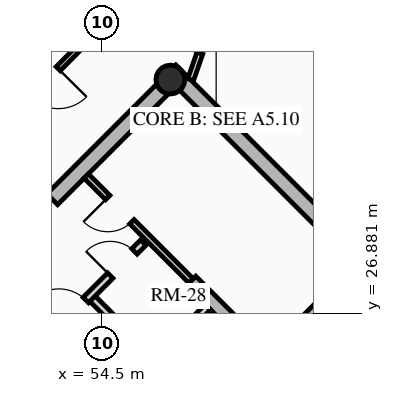
"""IFC4 building model, lengths in metres.
Left out: names, types, materials, properties, quantities, classifications, styles, units other than length and angle.
Written with IfcOpenShell. Run it as: python <this file> out.ifc"""

import sys

from ifc_helpers import new_model, si_unit, direction, frame, frame_2d, origin, origin_2d, place, context, subcontext, project, spatial, rectangle, hollow_circle, extrude, source, transform, mapped, element, fill, save


model = new_model("IFC4")
c1 = context("Model", 3, precision=1e-05, world=origin(), true_north=direction((0.0, 1.0)))
c2 = subcontext(c1, "Body", "Model", "MODEL_VIEW")
j1 = project(units=[si_unit("LENGTHUNIT", "METRE"), si_unit("PLANEANGLEUNIT", "RADIAN")], contexts=[c1])
p1 = place(None, origin())
s1 = spatial("IfcSite", under=j1, at=p1, CompositionType="ELEMENT")
p2 = place(p1, origin())
s2 = spatial("IfcBuilding", under=s1, at=p2, CompositionType="ELEMENT")
p3 = place(p2, frame((0.0, 0.0, 157.42)))
s3 = spatial("IfcBuildingStorey", under=s2, at=p3, CompositionType="ELEMENT", Elevation=157.42)
p4 = place(p3, frame((66.268, 23.298, 0.0), z_axis=(0.0, 0.0, 1.0), x_axis=(-0.707106781187, 0.707106781187, 0.0)))
e1 = element("IfcWall", 1, at=p4, inside=s3, PredefinedType="SHEAR", context=c2, shape_type="SweptSolid", body=[
    extrude(rectangle(XDim=14.1, YDim=0.4, at=frame_2d((7.05, 0.0))), origin(), (0.0, 0.0, 1.0), 2.91),
])
p5 = place(p3, frame((48.873, 25.561, 0.0), z_axis=(0.0, 0.0, 1.0), x_axis=(0.707106781187, 0.707106781187, 0.0)))
e2 = element("IfcWall", 2, at=p5, inside=s3, PredefinedType="SHEAR", context=c2, shape_type="SweptSolid", body=[
    extrude(rectangle(XDim=10.7, YDim=0.4, at=frame_2d((5.35, 0.0))), origin(), (0.0, 0.0, 1.0), 2.91),
])
m1 = source(origin(), c2, "Body", "SweptSolid", [
    extrude(rectangle(XDim=1.5, YDim=2.02, at=frame_2d((0.75, 1.01))), frame((0.0, 0.21, 0.0), z_axis=(0.0, -1.0, 0.0), x_axis=(1.0, 0.0, 0.0)), (0.0, 0.0, 1.0), 0.42),
])
p6 = place(p5, frame((4.6, 0.0, 0.0)))
e3 = element("IfcOpeningElement", 3, at=p6, cuts=e2, PredefinedType="OPENING", context=c2, shape_type="MappedRepresentation", body=[
    mapped(m1, transform((0.0, 0.0, 0.0), x_axis=(1.0, 0.0, 0.0), y_axis=(0.0, 1.0, 0.0), z_axis=(0.0, 0.0, 1.0), scale=1.0)),
])
p7 = place(p3, frame((61.06, 18.373, 0.0), z_axis=(0.0, 0.0, 1.0), x_axis=(-0.707106781187, 0.707106781187, 0.0)))
e4 = element("IfcWall", 4, at=p7, inside=s3, PredefinedType="SHEAR", context=c2, shape_type="SweptSolid", body=[
    extrude(rectangle(XDim=13.7, YDim=0.35, at=frame_2d((6.85, 0.0))), origin(), (0.0, 0.0, 1.0), 2.91),
])
m2 = source(origin(), c2, "Body", "SweptSolid", [
    extrude(rectangle(XDim=1.1, YDim=2.015, at=frame_2d((0.55, 1.007))), frame((0.0, 0.185, 0.0), z_axis=(0.0, -1.0, 0.0), x_axis=(1.0, 0.0, 0.0)), (0.0, 0.0, 1.0), 0.37),
])
p8 = place(p7, frame((4.85, 0.0, 0.0)))
e5 = element("IfcOpeningElement", 5, at=p8, cuts=e4, PredefinedType="OPENING", context=c2, shape_type="MappedRepresentation", body=[
    mapped(m2, transform((0.0, 0.0, 0.0), x_axis=(1.0, 0.0, 0.0), y_axis=(0.0, 1.0, 0.0), z_axis=(0.0, 0.0, 1.0), scale=1.0)),
])
p9 = place(p7, frame((0.625, 0.0, 0.0)))
e6 = element("IfcOpeningElement", 6, at=p9, cuts=e4, PredefinedType="OPENING", context=c2, shape_type="MappedRepresentation", body=[
    mapped(m2, transform((0.0, 0.0, 0.0), x_axis=(1.0, 0.0, 0.0), y_axis=(0.0, 1.0, 0.0), z_axis=(0.0, 0.0, 1.0), scale=1.0)),
])
p10 = place(p7, frame((2.625, 0.0, 0.0)))
e7 = element("IfcOpeningElement", 7, at=p10, cuts=e4, PredefinedType="OPENING", context=c2, shape_type="MappedRepresentation", body=[
    mapped(m2, transform((0.0, 0.0, 0.0), x_axis=(1.0, 0.0, 0.0), y_axis=(0.0, 1.0, 0.0), z_axis=(0.0, 0.0, 1.0), scale=1.0)),
])
m3 = source(origin(), c2, "Body", "SweptSolid", [
    extrude(rectangle(XDim=1.15, YDim=2.02, at=frame_2d((0.575, 1.01))), frame((0.0, 0.185, 0.0), z_axis=(0.0, -1.0, 0.0), x_axis=(1.0, 0.0, 0.0)), (0.0, 0.0, 1.0), 0.37),
])
p11 = place(p7, frame((7.27, 0.0, 0.0)))
e8 = element("IfcOpeningElement", 8, at=p11, cuts=e4, PredefinedType="OPENING", context=c2, shape_type="MappedRepresentation", body=[
    mapped(m3, transform((0.0, 0.0, 0.0), x_axis=(1.0, 0.0, 0.0), y_axis=(0.0, 1.0, 0.0), z_axis=(0.0, 0.0, 1.0), scale=1.0)),
])
p12 = place(p3, frame((63.627, 20.94, 0.0), z_axis=(0.0, 0.0, 1.0), x_axis=(-0.707119496762, 0.707094065383, 0.0)))
e9 = element("IfcWall", 9, at=p12, inside=s3, PredefinedType="SHEAR", context=c2, shape_type="SweptSolid", body=[
    extrude(rectangle(XDim=9.6, YDim=0.35, at=frame_2d((4.8, 0.0))), origin(), (0.0, 0.0, 1.0), 2.91),
])
p13 = place(p12, frame((5.28, 0.0, 0.0)))
e10 = element("IfcOpeningElement", 10, at=p13, cuts=e9, PredefinedType="OPENING", context=c2, shape_type="MappedRepresentation", body=[
    mapped(m3, transform((0.0, 0.0, 0.0), x_axis=(1.0, 0.0, 0.0), y_axis=(0.0, 1.0, 0.0), z_axis=(0.0, 0.0, 1.0), scale=1.0)),
])
p14 = place(p3, frame((58.893, 25.674, 0.0), z_axis=(0.0, 0.0, 1.0), x_axis=(0.707106781187, 0.707106781187, 0.0)))
e11 = element("IfcWall", 11, at=p14, inside=s3, PredefinedType="SHEAR", context=c2, shape_type="SweptSolid", body=[
    extrude(rectangle(XDim=3.285, YDim=0.35, at=frame_2d((1.643, 0.0))), origin(), (0.0, 0.0, 1.0), 2.91),
])
p15 = place(p3, frame((56.294, 33.024, 0.0), z_axis=(0.0, 0.0, 1.0), x_axis=(0.707106781187, 0.707106781187, 0.0)))
e12 = element("IfcColumn", 12, at=p15, inside=s3, PredefinedType="COLUMN", context=c2, shape_type="SweptSolid", body=[
    extrude(hollow_circle(Radius=0.38, WallThickness=0.032, at=origin_2d()), origin(), (0.0, 0.0, 1.0), 2.91),
])
p16 = place(p3, frame((54.961, 24.719, 0.0), z_axis=(0.0, 0.0, 1.0), x_axis=(0.707106781187, 0.707106781187, 0.0)))
e13 = element("IfcWall", 13, at=p16, inside=s3, PredefinedType="PARTITIONING", context=c2, shape_type="SweptSolid", body=[
    extrude(rectangle(XDim=3.28, YDim=0.2, at=frame_2d((1.64, 0.0))), origin(), (0.0, 0.0, 1.0), 2.675),
])
m4 = source(origin(), c2, "Body", "SweptSolid", [
    extrude(rectangle(XDim=0.9, YDim=2.005, at=frame_2d((0.45, 1.002))), frame((0.0, 0.11, 0.0), z_axis=(0.0, -1.0, 0.0), x_axis=(1.0, 0.0, 0.0)), (0.0, 0.0, 1.0), 0.22),
])
p17 = place(p16, frame((0.16, 0.0, 0.0)))
e14 = element("IfcOpeningElement", 14, at=p17, cuts=e13, PredefinedType="OPENING", context=c2, shape_type="MappedRepresentation", body=[
    mapped(m4, transform((0.0, 0.0, 0.0), x_axis=(1.0, 0.0, 0.0), y_axis=(0.0, 1.0, 0.0), z_axis=(0.0, 0.0, 1.0), scale=1.0)),
])
p18 = place(p3, frame((55.874, 25.631, 0.0), z_axis=(0.0, 0.0, 1.0), x_axis=(-0.707157639372, 0.707055919343, 0.0)))
e15 = element("IfcWall", 15, at=p18, inside=s3, PredefinedType="PARTITIONING", context=c2, shape_type="SweptSolid", body=[
    extrude(rectangle(XDim=2.4, YDim=0.2, at=frame_2d((1.2, 0.0))), origin(), (0.0, 0.0, 1.0), 2.675),
])
p19 = place(p3, frame((53.264, 26.416, 0.0), z_axis=(0.0, 0.0, 1.0), x_axis=(0.707106781187, 0.707106781187, 0.0)))
e16 = element("IfcWall", 16, at=p19, inside=s3, PredefinedType="PARTITIONING", context=c2, shape_type="SweptSolid", body=[
    extrude(rectangle(XDim=3.28, YDim=0.2, at=frame_2d((1.64, 0.0))), origin(), (0.0, 0.0, 1.0), 2.675),
])
m5 = source(origin(), c2, "Body", "SweptSolid", [
    extrude(rectangle(XDim=1.0, YDim=2.015, at=frame_2d((0.5, 1.007))), frame((0.0, 0.11, 0.0), z_axis=(0.0, -1.0, 0.0), x_axis=(1.0, 0.0, 0.0)), (0.0, 0.0, 1.0), 0.22),
])
p20 = place(p19, frame((0.14, 0.0, 0.0)))
e17 = element("IfcOpeningElement", 17, at=p20, cuts=e16, PredefinedType="OPENING", context=c2, shape_type="MappedRepresentation", body=[
    mapped(m5, transform((0.0, 0.0, 0.0), x_axis=(1.0, 0.0, 0.0), y_axis=(0.0, 1.0, 0.0), z_axis=(0.0, 0.0, 1.0), scale=1.0)),
])
p21 = place(p19, frame((2.05, 0.0, 0.0)))
e18 = element("IfcOpeningElement", 18, at=p21, cuts=e16, PredefinedType="OPENING", context=c2, shape_type="MappedRepresentation", body=[
    mapped(m4, transform((0.0, 0.0, 0.0), x_axis=(1.0, 0.0, 0.0), y_axis=(0.0, 1.0, 0.0), z_axis=(0.0, 0.0, 1.0), scale=1.0)),
])
p22 = place(p3, frame((56.839, 27.728, 0.0), z_axis=(0.0, 0.0, 1.0), x_axis=(-0.707106781187, 0.707106781187, 0.0)))
e19 = element("IfcWall", 19, at=p22, inside=s3, PredefinedType="PARTITIONING", context=c2, shape_type="SweptSolid", body=[
    extrude(rectangle(XDim=3.9, YDim=0.16, at=frame_2d((1.95, 0.0))), origin(), (0.0, 0.0, 1.0), 2.675),
])
m6 = source(origin(), c2, "Body", "SweptSolid", [
    extrude(rectangle(XDim=0.9, YDim=2.005, at=frame_2d((0.45, 1.002))), frame((0.0, 0.09, 0.0), z_axis=(0.0, -1.0, 0.0), x_axis=(1.0, 0.0, 0.0)), (0.0, 0.0, 1.0), 0.18),
])
p23 = place(p22, frame((2.2, 0.0, 0.0)))
e20 = element("IfcOpeningElement", 20, at=p23, cuts=e19, PredefinedType="OPENING", context=c2, shape_type="MappedRepresentation", body=[
    mapped(m6, transform((0.0, 0.0, 0.0), x_axis=(1.0, 0.0, 0.0), y_axis=(0.0, 1.0, 0.0), z_axis=(0.0, 0.0, 1.0), scale=1.0)),
])
p24 = place(p3, frame((54.501, 34.479, 0.0), z_axis=(0.0, 0.0, 1.0), x_axis=(-0.70346073929, -0.710734119258, 0.0)))
e21 = element("IfcWall", 21, at=p24, inside=s3, PredefinedType="PARTITIONING", context=c2, shape_type="SweptSolid", body=[
    extrude(rectangle(XDim=3.323, YDim=0.15, at=frame_2d((1.662, 0.0))), origin(), (0.0, 0.0, 1.0), 2.245),
])
m7 = source(origin(), c2, "Body", "SweptSolid", [
    extrude(rectangle(XDim=1.05, YDim=2.015, at=frame_2d((0.525, 1.007))), frame((0.0, 0.085, 0.0), z_axis=(0.0, -1.0, 0.0), x_axis=(1.0, 0.0, 0.0)), (0.0, 0.0, 1.0), 0.17),
])
p25 = place(p24, frame((1.645, 0.0, 0.0)))
e22 = element("IfcOpeningElement", 22, at=p25, cuts=e21, PredefinedType="OPENING", context=c2, shape_type="MappedRepresentation", body=[
    mapped(m7, transform((0.0, 0.0, 0.0), x_axis=(1.0, 0.0, 0.0), y_axis=(0.0, 1.0, 0.0), z_axis=(0.0, 0.0, 1.0), scale=1.0)),
])
p26 = place(p3, frame((56.828, 33.021, 0.0), z_axis=(0.0, 0.0, 1.0), x_axis=(0.328682472103, 0.944440486496, 0.0)))
e23 = element("IfcWall", 23, at=p26, inside=s3, PredefinedType="PARTITIONING", context=c2, shape_type="SweptSolid", body=[
    extrude(rectangle(XDim=1.989, YDim=0.16, at=frame_2d((0.995, 0.0))), origin(), (0.0, 0.0, 1.0), 2.245),
])
m8 = source(origin(), c2, "Body", "SweptSolid", [
    extrude(rectangle(XDim=1.05, YDim=2.015, at=frame_2d((0.525, 1.007))), frame((0.0, 0.09, 0.0), z_axis=(0.0, -1.0, 0.0), x_axis=(1.0, 0.0, 0.0)), (0.0, 0.0, 1.0), 0.18),
])
p27 = place(p26, frame((0.739, 0.0, 0.0)))
e24 = element("IfcOpeningElement", 24, at=p27, cuts=e23, PredefinedType="OPENING", context=c2, shape_type="MappedRepresentation", body=[
    mapped(m8, transform((0.0, 0.0, 0.0), x_axis=(1.0, 0.0, 0.0), y_axis=(0.0, 1.0, 0.0), z_axis=(0.0, 0.0, 1.0), scale=1.0)),
])
m9 = source(origin(), c2, "Body", "SweptSolid", [
    extrude(rectangle(XDim=1.5, YDim=2.02, at=frame_2d((0.75, 1.01))), frame((0.0, 0.025, 0.0), z_axis=(0.0, -1.0, 0.0), x_axis=(1.0, 0.0, 0.0)), (0.0, 0.0, 1.0), 0.05),
])
p28 = place(p6, origin())
e25 = element("IfcDoor", 25, at=p28, inside=s3, OperationType="DOUBLE_DOOR_SINGLE_SWING", PredefinedType="DOOR", context=c2, shape_type="MappedRepresentation", body=[
    mapped(m9, transform((0.0, 0.0, 0.0), x_axis=(1.0, 0.0, 0.0), y_axis=(0.0, 1.0, 0.0), z_axis=(0.0, 0.0, 1.0), scale=1.0)),
])
fill(e3, e25)
m10 = source(origin(), c2, "Body", "SweptSolid", [
    extrude(rectangle(XDim=1.0, YDim=2.015, at=frame_2d((0.5, 1.007))), frame((0.0, 0.025, 0.0), z_axis=(0.0, -1.0, 0.0), x_axis=(1.0, 0.0, 0.0)), (0.0, 0.0, 1.0), 0.05),
])
p29 = place(p20, origin())
e26 = element("IfcDoor", 26, at=p29, inside=s3, OperationType="SINGLE_SWING_LEFT", PredefinedType="DOOR", context=c2, shape_type="MappedRepresentation", body=[
    mapped(m10, transform((0.0, 0.0, 0.0), x_axis=(1.0, 0.0, 0.0), y_axis=(0.0, 1.0, 0.0), z_axis=(0.0, 0.0, 1.0), scale=1.0)),
])
fill(e17, e26)
m11 = source(origin(), c2, "Body", "SweptSolid", [
    extrude(rectangle(XDim=0.9, YDim=2.005, at=frame_2d((0.45, 1.002))), frame((0.0, 0.025, 0.0), z_axis=(0.0, -1.0, 0.0), x_axis=(1.0, 0.0, 0.0)), (0.0, 0.0, 1.0), 0.05),
])
p30 = place(p21, origin())
e27 = element("IfcDoor", 27, at=p30, inside=s3, OperationType="SINGLE_SWING_LEFT", PredefinedType="DOOR", context=c2, shape_type="MappedRepresentation", body=[
    mapped(m11, transform((0.0, 0.0, 0.0), x_axis=(1.0, 0.0, 0.0), y_axis=(0.0, 1.0, 0.0), z_axis=(0.0, 0.0, 1.0), scale=1.0)),
])
fill(e18, e27)
p31 = place(p23, origin())
e28 = element("IfcDoor", 28, at=p31, inside=s3, OperationType="SINGLE_SWING_RIGHT", PredefinedType="DOOR", context=c2, shape_type="MappedRepresentation", body=[
    mapped(m11, transform((0.0, 0.0, 0.0), x_axis=(1.0, 0.0, 0.0), y_axis=(0.0, 1.0, 0.0), z_axis=(0.0, 0.0, 1.0), scale=1.0)),
])
fill(e20, e28)
m12 = source(origin(), c2, "Body", "SweptSolid", [
    extrude(rectangle(XDim=1.05, YDim=2.015, at=frame_2d((0.525, 1.007))), frame((0.0, 0.025, 0.0), z_axis=(0.0, -1.0, 0.0), x_axis=(1.0, 0.0, 0.0)), (0.0, 0.0, 1.0), 0.05),
])
p32 = place(p27, origin())
e29 = element("IfcDoor", 29, at=p32, inside=s3, OperationType="SINGLE_SWING_LEFT", PredefinedType="DOOR", context=c2, shape_type="MappedRepresentation", body=[
    mapped(m12, transform((0.0, 0.0, 0.0), x_axis=(1.0, 0.0, 0.0), y_axis=(0.0, 1.0, 0.0), z_axis=(0.0, 0.0, 1.0), scale=1.0)),
])
fill(e24, e29)
p33 = place(p25, origin())
e30 = element("IfcDoor", 30, at=p33, inside=s3, OperationType="SINGLE_SWING_LEFT", PredefinedType="DOOR", context=c2, shape_type="MappedRepresentation", body=[
    mapped(m12, transform((0.0, 0.0, 0.0), x_axis=(1.0, 0.0, 0.0), y_axis=(0.0, 1.0, 0.0), z_axis=(0.0, 0.0, 1.0), scale=1.0)),
])
fill(e22, e30)
save(model, sys.argv[1])
